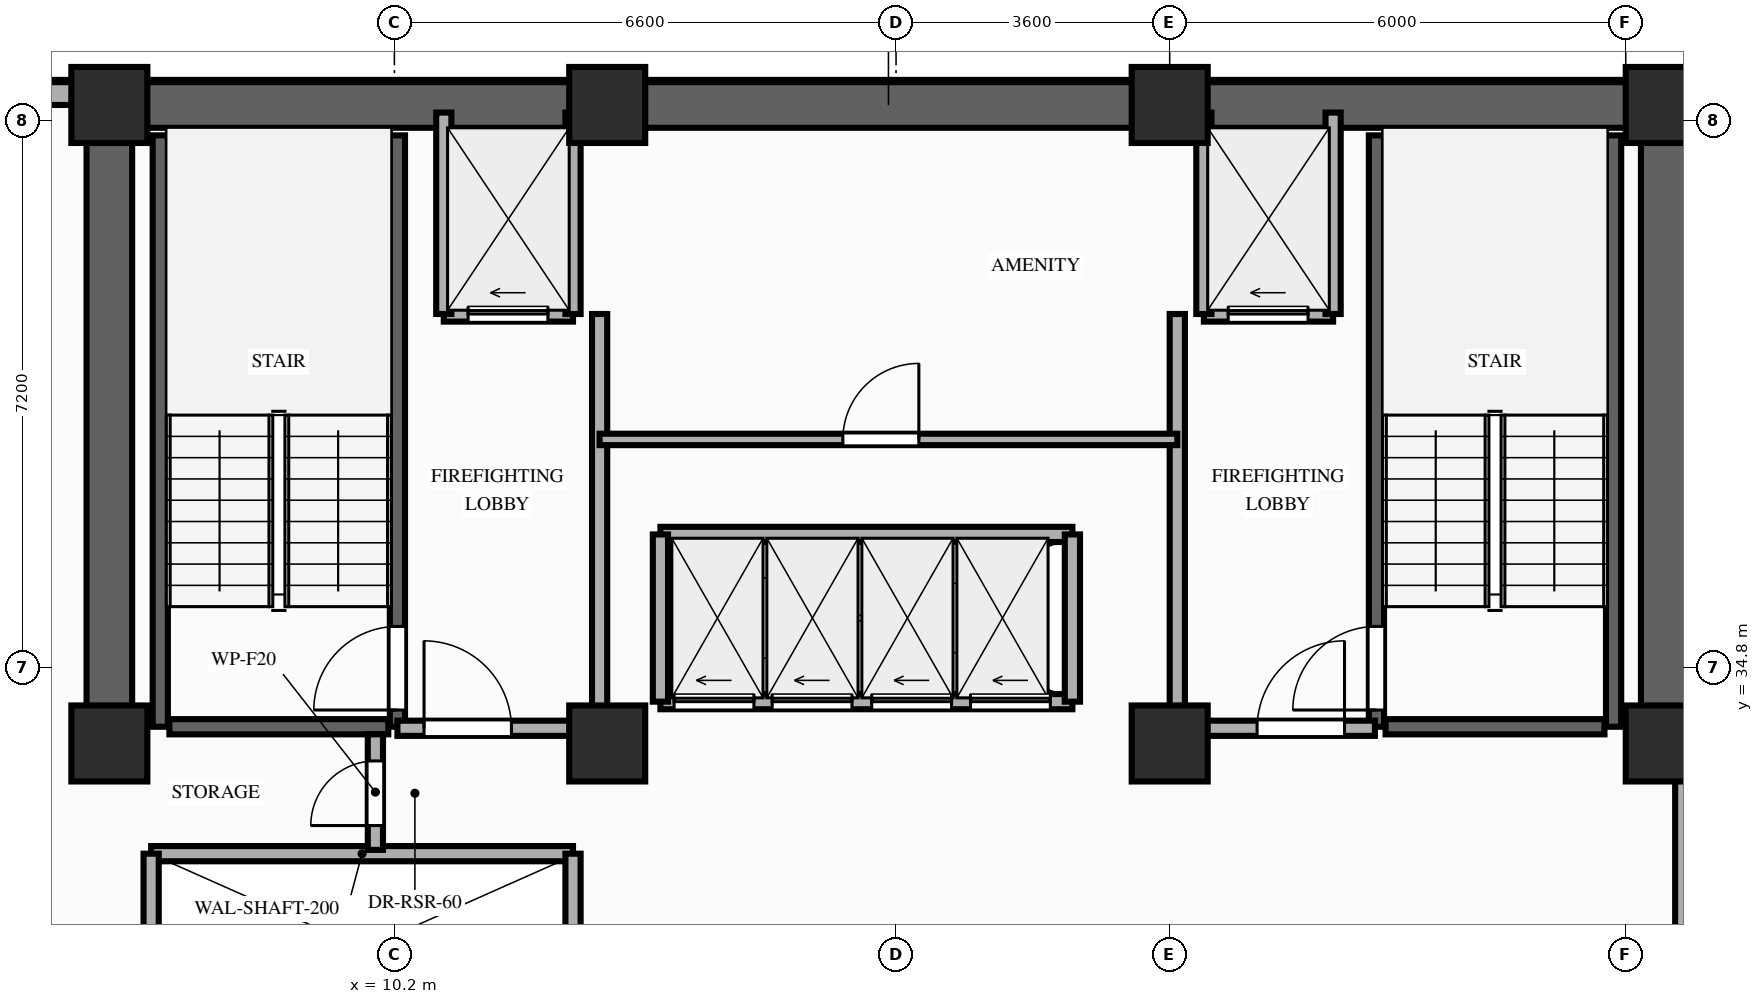
"""IFC4 building model, lengths in metres.
Left out: names, types, materials, properties, quantities, classifications, styles, units other than length and angle.
Written with IfcOpenShell. Run it as: python <this file> out.ifc"""

import sys

from ifc_helpers import new_model, si_unit, direction, frame, frame_2d, origin, origin_2d, place, context, subcontext, project, spatial, rectangle, extrude, element, fill, save


model = new_model("IFC4")
c1 = context("Model", 3, precision=1e-05, world=origin(), true_north=direction((0.0, 1.0)))
c2 = subcontext(c1, "Body", "Model", "MODEL_VIEW")
j1 = project(units=[si_unit("LENGTHUNIT", "METRE"), si_unit("PLANEANGLEUNIT", "RADIAN")], contexts=[c1])
p1 = place(None, origin())
s1 = spatial("IfcSite", under=j1, at=p1, CompositionType="ELEMENT")
p2 = place(p1, origin())
s2 = spatial("IfcBuilding", under=s1, at=p2, CompositionType="ELEMENT")
p3 = place(p2, frame((0.0, 0.0, 117.0)))
s3 = spatial("IfcBuildingStorey", under=s2, at=p3, CompositionType="ELEMENT", Elevation=117.0)
for number, where, z_axis, x_axis in (
    (1, (6.45, 33.8, 0.0), (0.0, 0.0, 1.0), (1.0, 0.0, 0.0)),
    (2, (13.0, 33.8, 0.0), (0.0, 0.0, 1.0), (1.0, 0.0, 0.0)),
    (3, (20.4, 33.8, 0.0), (0.0, 0.0, 1.0), (1.0, 0.0, 0.0)),
    (4, (26.9, 33.8, 0.0), (0.0, 0.0, 1.0), (1.0, 0.0, 0.0)),
    (5, (6.45, 42.2, 0.0), (0.0, 0.0, 1.0), (1.0, 0.0, 0.0)),
    (6, (13.0, 42.2, 0.0), (0.0, 0.0, 1.0), (1.0, 0.0, 0.0)),
    (7, (20.4, 42.2, 0.0), (0.0, 0.0, 1.0), (1.0, 0.0, 0.0)),
    (8, (26.9, 42.2, 0.0), (0.0, 0.0, 1.0), (1.0, 0.0, 0.0)),
):
    element("IfcColumn", number, at=place(p3, frame(where, z_axis=z_axis, x_axis=x_axis)), inside=s3, PredefinedType="COLUMN", context=c2, shape_type="SweptSolid", body=[
        extrude(rectangle(XDim=1.0, YDim=1.0, at=origin_2d()), origin(), (0.0, 0.0, 1.0), 3.2),
    ])
p4 = place(p3, frame((6.0, 42.35, 0.0), z_axis=(0.0, 0.0, 1.0), x_axis=(-1.0, 0.0, 0.0)))
e9 = element("IfcWall", 9, at=p4, inside=s3, PredefinedType="STANDARD", context=c2, shape_type="SweptSolid", body=[
    extrude(rectangle(XDim=2.0, YDim=0.3, at=frame_2d((1.0, 0.0))), origin(), (0.0, 0.0, 1.0), 3.02),
])
p5 = place(p3, frame((6.45, 42.2, 0.0), z_axis=(0.0, 0.0, 1.0), x_axis=(1.0, 0.0, 0.0)))
e10 = element("IfcWall", 10, at=p5, inside=s3, PredefinedType="SHEAR", context=c2, shape_type="SweptSolid", body=[
    extrude(rectangle(XDim=20.45, YDim=0.6, at=frame_2d((10.225, 0.0))), origin(), (0.0, 0.0, 1.0), 3.02),
])
for number, where, z_axis, x_axis in (
    (11, (6.45, 33.8, 0.0), (0.0, 0.0, 1.0), (0.0, 1.0, 0.0)),
    (12, (26.9, 33.8, 0.0), (0.0, 0.0, 1.0), (0.0, 1.0, 0.0)),
):
    element("IfcWall", number, at=place(p3, frame(where, z_axis=z_axis, x_axis=x_axis)), inside=s3, PredefinedType="SHEAR", context=c2, shape_type="SweptSolid", body=[
        extrude(rectangle(XDim=7.95, YDim=0.6, at=frame_2d((3.975, 0.0))), origin(), (0.0, 0.0, 1.0), 3.02),
    ])
p6 = place(p3, frame((7.12, 34.02, 0.0), z_axis=(0.0, 0.0, 1.0), x_axis=(0.0, 1.0, 0.0)))
e13 = element("IfcWall", 13, at=p6, inside=s3, PredefinedType="SHEAR", context=c2, shape_type="SweptSolid", body=[
    extrude(rectangle(XDim=7.78, YDim=0.2, at=frame_2d((3.89, 0.0))), origin(), (0.0, 0.0, 1.0), 3.02),
])
p7 = place(p3, frame((10.24, 34.02, 0.0), z_axis=(0.0, 0.0, 1.0), x_axis=(0.0, 1.0, 0.0)))
e14 = element("IfcWall", 14, at=p7, inside=s3, PredefinedType="SHEAR", context=c2, shape_type="SweptSolid", body=[
    extrude(rectangle(XDim=7.78, YDim=0.2, at=frame_2d((3.89, 0.0))), origin(), (0.0, 0.0, 1.0), 3.02),
])
p8 = place(p7, frame((0.22, 0.0, 0.0)))
e15 = element("IfcOpeningElement", 15, at=p8, cuts=e14, PredefinedType="OPENING", context=c2, shape_type="SweptSolid", body=[
    extrude(rectangle(XDim=1.1, YDim=2.15, at=frame_2d((0.55, 1.075))), frame((0.0, 0.11, 0.0), z_axis=(0.0, -1.0, 0.0), x_axis=(1.0, 0.0, 0.0)), (0.0, 0.0, 1.0), 0.22),
])
p9 = place(p3, frame((7.24, 34.02, 0.0), z_axis=(0.0, 0.0, 1.0), x_axis=(1.0, 0.0, 0.0)))
e16 = element("IfcWall", 16, at=p9, inside=s3, PredefinedType="SHEAR", context=c2, shape_type="SweptSolid", body=[
    extrude(rectangle(XDim=2.88, YDim=0.2, at=frame_2d((1.44, 0.0))), origin(), (0.0, 0.0, 1.0), 3.02),
])
p10 = place(p3, frame((23.12, 34.02, 0.0), z_axis=(0.0, 0.0, 1.0), x_axis=(0.0, 1.0, 0.0)))
e17 = element("IfcWall", 17, at=p10, inside=s3, PredefinedType="SHEAR", context=c2, shape_type="SweptSolid", body=[
    extrude(rectangle(XDim=7.78, YDim=0.2, at=frame_2d((3.89, 0.0))), origin(), (0.0, 0.0, 1.0), 3.02),
])
p11 = place(p10, frame((0.22, 0.0, 0.0)))
e18 = element("IfcOpeningElement", 18, at=p11, cuts=e17, PredefinedType="OPENING", context=c2, shape_type="SweptSolid", body=[
    extrude(rectangle(XDim=1.1, YDim=2.15, at=frame_2d((0.55, 1.075))), frame((0.0, 0.11, 0.0), z_axis=(0.0, -1.0, 0.0), x_axis=(1.0, 0.0, 0.0)), (0.0, 0.0, 1.0), 0.22),
])
p12 = place(p3, frame((26.24, 34.02, 0.0), z_axis=(0.0, 0.0, 1.0), x_axis=(0.0, 1.0, 0.0)))
e19 = element("IfcWall", 19, at=p12, inside=s3, PredefinedType="SHEAR", context=c2, shape_type="SweptSolid", body=[
    extrude(rectangle(XDim=7.78, YDim=0.2, at=frame_2d((3.89, 0.0))), origin(), (0.0, 0.0, 1.0), 3.02),
])
p13 = place(p3, frame((23.24, 34.02, 0.0), z_axis=(0.0, 0.0, 1.0), x_axis=(1.0, 0.0, 0.0)))
e20 = element("IfcWall", 20, at=p13, inside=s3, PredefinedType="SHEAR", context=c2, shape_type="SweptSolid", body=[
    extrude(rectangle(XDim=2.88, YDim=0.2, at=frame_2d((1.44, 0.0))), origin(), (0.0, 0.0, 1.0), 3.02),
])
p14 = place(p3, frame((7.0, 32.35, 0.0), z_axis=(0.0, 0.0, 1.0), x_axis=(1.0, 0.0, 0.0)))
e21 = element("IfcWall", 21, at=p14, inside=s3, PredefinedType="MOVABLE", context=c2, shape_type="SweptSolid", body=[
    extrude(rectangle(XDim=5.55, YDim=0.2, at=frame_2d((2.775, 0.0))), origin(), (0.0, 0.0, 1.0), 3.02),
])
for number, where, z_axis, x_axis in (
    (22, (7.0, 29.85, 0.0), (0.0, 0.0, 1.0), (0.0, 1.0, 0.0)),
    (23, (12.55, 29.85, 0.0), (0.0, 0.0, 1.0), (0.0, 1.0, 0.0)),
):
    element("IfcWall", number, at=place(p3, frame(where, z_axis=z_axis, x_axis=x_axis)), inside=s3, PredefinedType="MOVABLE", context=c2, shape_type="SweptSolid", body=[
        extrude(rectangle(XDim=2.5, YDim=0.2, at=frame_2d((1.25, 0.0))), origin(), (0.0, 0.0, 1.0), 3.02),
    ])
p15 = place(p3, frame((10.85, 39.45, 0.0), z_axis=(0.0, 0.0, 1.0), x_axis=(1.0, 0.0, 0.0)))
e24 = element("IfcWall", 24, at=p15, inside=s3, PredefinedType="MOVABLE", context=c2, shape_type="SweptSolid", body=[
    extrude(rectangle(XDim=1.7, YDim=0.2, at=frame_2d((0.85, 0.0))), origin(), (0.0, 0.0, 1.0), 3.02),
])
p16 = place(p15, frame((0.32, 0.0, 0.0)))
e25 = element("IfcOpeningElement", 25, at=p16, cuts=e24, PredefinedType="OPENING", context=c2, shape_type="SweptSolid", body=[
    extrude(rectangle(XDim=1.05, YDim=2.15, at=frame_2d((0.525, 1.075))), frame((0.0, 0.11, 0.0), z_axis=(0.0, -1.0, 0.0), x_axis=(1.0, 0.0, 0.0)), (0.0, 0.0, 1.0), 0.22),
])
p17 = place(p3, frame((20.85, 39.45, 0.0), z_axis=(0.0, 0.0, 1.0), x_axis=(1.0, 0.0, 0.0)))
e26 = element("IfcWall", 26, at=p17, inside=s3, PredefinedType="MOVABLE", context=c2, shape_type="SweptSolid", body=[
    extrude(rectangle(XDim=1.7, YDim=0.2, at=frame_2d((0.85, 0.0))), origin(), (0.0, 0.0, 1.0), 3.02),
])
p18 = place(p17, frame((0.32, 0.0, 0.0)))
e27 = element("IfcOpeningElement", 27, at=p18, cuts=e26, PredefinedType="OPENING", context=c2, shape_type="SweptSolid", body=[
    extrude(rectangle(XDim=1.05, YDim=2.15, at=frame_2d((0.525, 1.075))), frame((0.0, 0.11, 0.0), z_axis=(0.0, -1.0, 0.0), x_axis=(1.0, 0.0, 0.0)), (0.0, 0.0, 1.0), 0.22),
])
for number, where, z_axis, x_axis in (
    (28, (10.85, 39.45, 0.0), (0.0, 0.0, 1.0), (0.0, 1.0, 0.0)),
    (29, (12.55, 39.45, 0.0), (0.0, 0.0, 1.0), (0.0, 1.0, 0.0)),
):
    element("IfcWall", number, at=place(p3, frame(where, z_axis=z_axis, x_axis=x_axis)), inside=s3, PredefinedType="MOVABLE", context=c2, shape_type="SweptSolid", body=[
        extrude(rectangle(XDim=2.65, YDim=0.2, at=frame_2d((1.325, 0.0))), origin(), (0.0, 0.0, 1.0), 2.41),
    ])
p19 = place(p3, frame((12.9, 34.0, 0.0), z_axis=(0.0, 0.0, 1.0), x_axis=(0.0, 1.0, 0.0)))
e30 = element("IfcWall", 30, at=p19, inside=s3, PredefinedType="PARTITIONING", context=c2, shape_type="SweptSolid", body=[
    extrude(rectangle(XDim=5.45, YDim=0.2, at=frame_2d((2.725, 0.0))), origin(), (0.0, 0.0, 1.0), 2.41),
])
p20 = place(p3, frame((10.24, 34.0, 0.0), z_axis=(0.0, 0.0, 1.0), x_axis=(1.0, 0.0, 0.0)))
e31 = element("IfcWall", 31, at=p20, inside=s3, PredefinedType="PARTITIONING", context=c2, shape_type="SweptSolid", body=[
    extrude(rectangle(XDim=2.66, YDim=0.2, at=frame_2d((1.33, 0.0))), origin(), (0.0, 0.0, 1.0), 2.41),
])
p21 = place(p20, frame((0.35, 0.0, 0.0)))
e32 = element("IfcOpeningElement", 32, at=p21, cuts=e31, PredefinedType="OPENING", context=c2, shape_type="SweptSolid", body=[
    extrude(rectangle(XDim=1.15, YDim=2.15, at=frame_2d((0.575, 1.075))), frame((0.0, 0.11, 0.0), z_axis=(0.0, -1.0, 0.0), x_axis=(1.0, 0.0, 0.0)), (0.0, 0.0, 1.0), 0.22),
])
for number, where, z_axis, x_axis in (
    (33, (20.85, 39.45, 0.0), (0.0, 0.0, 1.0), (0.0, 1.0, 0.0)),
    (34, (22.55, 39.45, 0.0), (0.0, 0.0, 1.0), (0.0, 1.0, 0.0)),
):
    element("IfcWall", number, at=place(p3, frame(where, z_axis=z_axis, x_axis=x_axis)), inside=s3, PredefinedType="MOVABLE", context=c2, shape_type="SweptSolid", body=[
        extrude(rectangle(XDim=2.65, YDim=0.2, at=frame_2d((1.325, 0.0))), origin(), (0.0, 0.0, 1.0), 2.41),
    ])
p22 = place(p3, frame((20.5, 34.0, 0.0), z_axis=(0.0, 0.0, 1.0), x_axis=(0.0, 1.0, 0.0)))
e35 = element("IfcWall", 35, at=p22, inside=s3, PredefinedType="PARTITIONING", context=c2, shape_type="SweptSolid", body=[
    extrude(rectangle(XDim=5.45, YDim=0.2, at=frame_2d((2.725, 0.0))), origin(), (0.0, 0.0, 1.0), 2.41),
])
p23 = place(p3, frame((20.5, 34.0, 0.0), z_axis=(0.0, 0.0, 1.0), x_axis=(1.0, 0.0, 0.0)))
e36 = element("IfcWall", 36, at=p23, inside=s3, PredefinedType="PARTITIONING", context=c2, shape_type="SweptSolid", body=[
    extrude(rectangle(XDim=2.6, YDim=0.2, at=frame_2d((1.3, 0.0))), origin(), (0.0, 0.0, 1.0), 2.41),
])
p24 = place(p23, frame((1.05, 0.0, 0.0)))
e37 = element("IfcOpeningElement", 37, at=p24, cuts=e36, PredefinedType="OPENING", context=c2, shape_type="SweptSolid", body=[
    extrude(rectangle(XDim=1.15, YDim=2.15, at=frame_2d((0.575, 1.075))), frame((0.0, 0.11, 0.0), z_axis=(0.0, -1.0, 0.0), x_axis=(1.0, 0.0, 0.0)), (0.0, 0.0, 1.0), 0.22),
])
p25 = place(p3, frame((9.95, 32.4, 0.0), z_axis=(0.0, 0.0, 1.0), x_axis=(0.0, 1.0, 0.0)))
e38 = element("IfcWall", 38, at=p25, inside=s3, PredefinedType="PARTITIONING", context=c2, shape_type="SweptSolid", body=[
    extrude(rectangle(XDim=1.52, YDim=0.2, at=frame_2d((0.76, 0.0))), origin(), (0.0, 0.0, 1.0), 2.41),
])
p26 = place(p25, frame((0.32, 0.0, 0.0)))
e39 = element("IfcOpeningElement", 39, at=p26, cuts=e38, PredefinedType="OPENING", context=c2, shape_type="SweptSolid", body=[
    extrude(rectangle(XDim=0.85, YDim=2.05, at=frame_2d((0.425, 1.025))), frame((0.0, 0.11, 0.0), z_axis=(0.0, -1.0, 0.0), x_axis=(1.0, 0.0, 0.0)), (0.0, 0.0, 1.0), 0.22),
])
p27 = place(p3, frame((12.9, 37.8, 0.0), z_axis=(0.0, 0.0, 1.0), x_axis=(1.0, 0.0, 0.0)))
e40 = element("IfcWall", 40, at=p27, inside=s3, PredefinedType="PARTITIONING", context=c2, shape_type="SweptSolid", body=[
    extrude(rectangle(XDim=7.6, YDim=0.15, at=frame_2d((3.8, 0.0))), origin(), (0.0, 0.0, 1.0), 3.02),
])
p28 = place(p27, frame((3.2, 0.0, 0.0)))
e41 = element("IfcOpeningElement", 41, at=p28, cuts=e40, PredefinedType="OPENING", context=c2, shape_type="SweptSolid", body=[
    extrude(rectangle(XDim=1.0, YDim=2.15, at=frame_2d((0.5, 1.075))), frame((0.0, 0.085, 0.0), z_axis=(0.0, -1.0, 0.0), x_axis=(1.0, 0.0, 0.0)), (0.0, 0.0, 1.0), 0.17),
])
p29 = place(p3, frame((13.7, 34.35, 0.0), z_axis=(0.0, 0.0, 1.0), x_axis=(1.0, 0.0, 0.0)))
e42 = element("IfcWall", 42, at=p29, inside=s3, PredefinedType="MOVABLE", context=c2, shape_type="SweptSolid", body=[
    extrude(rectangle(XDim=5.42, YDim=0.2, at=frame_2d((2.71, 0.0))), origin(), (0.0, 0.0, 1.0), 3.02),
])
p30 = place(p29, frame((0.18, 0.0, 0.0)))
e43 = element("IfcOpeningElement", 43, at=p30, cuts=e42, PredefinedType="OPENING", context=c2, shape_type="SweptSolid", body=[
    extrude(rectangle(XDim=1.05, YDim=2.15, at=frame_2d((0.525, 1.075))), frame((0.0, 0.11, 0.0), z_axis=(0.0, -1.0, 0.0), x_axis=(1.0, 0.0, 0.0)), (0.0, 0.0, 1.0), 0.22),
])
p31 = place(p29, frame((1.47, 0.0, 0.0)))
e44 = element("IfcOpeningElement", 44, at=p31, cuts=e42, PredefinedType="OPENING", context=c2, shape_type="SweptSolid", body=[
    extrude(rectangle(XDim=1.05, YDim=2.15, at=frame_2d((0.525, 1.075))), frame((0.0, 0.11, 0.0), z_axis=(0.0, -1.0, 0.0), x_axis=(1.0, 0.0, 0.0)), (0.0, 0.0, 1.0), 0.22),
])
p32 = place(p29, frame((2.78, 0.0, 0.0)))
e45 = element("IfcOpeningElement", 45, at=p32, cuts=e42, PredefinedType="OPENING", context=c2, shape_type="SweptSolid", body=[
    extrude(rectangle(XDim=1.05, YDim=2.15, at=frame_2d((0.525, 1.075))), frame((0.0, 0.11, 0.0), z_axis=(0.0, -1.0, 0.0), x_axis=(1.0, 0.0, 0.0)), (0.0, 0.0, 1.0), 0.22),
])
p33 = place(p29, frame((4.08, 0.0, 0.0)))
e46 = element("IfcOpeningElement", 46, at=p33, cuts=e42, PredefinedType="OPENING", context=c2, shape_type="SweptSolid", body=[
    extrude(rectangle(XDim=1.05, YDim=2.15, at=frame_2d((0.525, 1.075))), frame((0.0, 0.11, 0.0), z_axis=(0.0, -1.0, 0.0), x_axis=(1.0, 0.0, 0.0)), (0.0, 0.0, 1.0), 0.22),
])
p34 = place(p3, frame((13.7, 36.55, 0.0), z_axis=(0.0, 0.0, 1.0), x_axis=(1.0, 0.0, 0.0)))
e47 = element("IfcWall", 47, at=p34, inside=s3, PredefinedType="MOVABLE", context=c2, shape_type="SweptSolid", body=[
    extrude(rectangle(XDim=5.42, YDim=0.2, at=frame_2d((2.71, 0.0))), origin(), (0.0, 0.0, 1.0), 3.02),
])
for number, where, z_axis, x_axis in (
    (48, (13.7, 34.35, 0.0), (0.0, 0.0, 1.0), (0.0, 1.0, 0.0)),
    (49, (19.12, 34.35, 0.0), (0.0, 0.0, 1.0), (0.0, 1.0, 0.0)),
):
    element("IfcWall", number, at=place(p3, frame(where, z_axis=z_axis, x_axis=x_axis)), inside=s3, PredefinedType="MOVABLE", context=c2, shape_type="SweptSolid", body=[
        extrude(rectangle(XDim=2.2, YDim=0.2, at=frame_2d((1.1, 0.0))), origin(), (0.0, 0.0, 1.0), 3.02),
    ])
p35 = place(p3, frame((27.15, 31.2, 0.0), z_axis=(0.0, 0.0, 1.0), x_axis=(0.0, 1.0, 0.0)))
e50 = element("IfcWall", 50, at=p35, inside=s3, PredefinedType="PARTITIONING", context=c2, shape_type="SweptSolid", body=[
    extrude(rectangle(XDim=2.48, YDim=0.2, at=frame_2d((1.24, 0.0))), origin(), (0.0, 0.0, 1.0), 2.41),
])
p36 = place(p8, origin())
e51 = element("IfcDoor", 51, at=p36, inside=s3, OperationType="SINGLE_SWING_LEFT", PredefinedType="DOOR", context=c2, shape_type="SweptSolid", body=[
    extrude(rectangle(XDim=1.1, YDim=2.15, at=frame_2d((0.55, 1.075))), frame((0.0, 0.025, 0.0), z_axis=(0.0, -1.0, 0.0), x_axis=(1.0, 0.0, 0.0)), (0.0, 0.0, 1.0), 0.05),
])
fill(e15, e51)
p37 = place(p11, origin())
e52 = element("IfcDoor", 52, at=p37, inside=s3, OperationType="SINGLE_SWING_LEFT", PredefinedType="DOOR", context=c2, shape_type="SweptSolid", body=[
    extrude(rectangle(XDim=1.1, YDim=2.15, at=frame_2d((0.55, 1.075))), frame((0.0, 0.025, 0.0), z_axis=(0.0, -1.0, 0.0), x_axis=(1.0, 0.0, 0.0)), (0.0, 0.0, 1.0), 0.05),
])
fill(e18, e52)
p38 = place(p16, origin())
e53 = element("IfcDoor", 53, at=p38, inside=s3, OperationType="SLIDING_TO_LEFT", PredefinedType="DOOR", context=c2, shape_type="SweptSolid", body=[
    extrude(rectangle(XDim=1.05, YDim=2.15, at=frame_2d((0.525, 1.075))), frame((0.0, 0.025, 0.0), z_axis=(0.0, -1.0, 0.0), x_axis=(1.0, 0.0, 0.0)), (0.0, 0.0, 1.0), 0.05),
])
fill(e25, e53)
p39 = place(p18, origin())
e54 = element("IfcDoor", 54, at=p39, inside=s3, OperationType="SLIDING_TO_LEFT", PredefinedType="DOOR", context=c2, shape_type="SweptSolid", body=[
    extrude(rectangle(XDim=1.05, YDim=2.15, at=frame_2d((0.525, 1.075))), frame((0.0, 0.025, 0.0), z_axis=(0.0, -1.0, 0.0), x_axis=(1.0, 0.0, 0.0)), (0.0, 0.0, 1.0), 0.05),
])
fill(e27, e54)
p40 = place(p21, origin())
e55 = element("IfcDoor", 55, at=p40, inside=s3, OperationType="SINGLE_SWING_LEFT", PredefinedType="DOOR", context=c2, shape_type="SweptSolid", body=[
    extrude(rectangle(XDim=1.15, YDim=2.15, at=frame_2d((0.575, 1.075))), frame((0.0, 0.025, 0.0), z_axis=(0.0, -1.0, 0.0), x_axis=(1.0, 0.0, 0.0)), (0.0, 0.0, 1.0), 0.05),
])
fill(e32, e55)
p41 = place(p24, origin())
e56 = element("IfcDoor", 56, at=p41, inside=s3, OperationType="SINGLE_SWING_RIGHT", PredefinedType="DOOR", context=c2, shape_type="SweptSolid", body=[
    extrude(rectangle(XDim=1.15, YDim=2.15, at=frame_2d((0.575, 1.075))), frame((0.0, 0.025, 0.0), z_axis=(0.0, -1.0, 0.0), x_axis=(1.0, 0.0, 0.0)), (0.0, 0.0, 1.0), 0.05),
])
fill(e37, e56)
p42 = place(p26, origin())
e57 = element("IfcDoor", 57, at=p42, inside=s3, OperationType="SINGLE_SWING_LEFT", PredefinedType="DOOR", context=c2, shape_type="SweptSolid", body=[
    extrude(rectangle(XDim=0.85, YDim=2.05, at=frame_2d((0.425, 1.025))), frame((0.0, 0.025, 0.0), z_axis=(0.0, -1.0, 0.0), x_axis=(1.0, 0.0, 0.0)), (0.0, 0.0, 1.0), 0.05),
])
fill(e39, e57)
p43 = place(p28, origin())
e58 = element("IfcDoor", 58, at=p43, inside=s3, OperationType="SINGLE_SWING_RIGHT", PredefinedType="DOOR", context=c2, shape_type="SweptSolid", body=[
    extrude(rectangle(XDim=1.0, YDim=2.15, at=frame_2d((0.5, 1.075))), frame((0.0, 0.025, 0.0), z_axis=(0.0, -1.0, 0.0), x_axis=(1.0, 0.0, 0.0)), (0.0, 0.0, 1.0), 0.05),
])
fill(e41, e58)
p44 = place(p30, origin())
e59 = element("IfcDoor", 59, at=p44, inside=s3, OperationType="SLIDING_TO_LEFT", PredefinedType="DOOR", context=c2, shape_type="SweptSolid", body=[
    extrude(rectangle(XDim=1.05, YDim=2.15, at=frame_2d((0.525, 1.075))), frame((0.0, 0.025, 0.0), z_axis=(0.0, -1.0, 0.0), x_axis=(1.0, 0.0, 0.0)), (0.0, 0.0, 1.0), 0.05),
])
fill(e43, e59)
p45 = place(p31, origin())
e60 = element("IfcDoor", 60, at=p45, inside=s3, OperationType="SLIDING_TO_LEFT", PredefinedType="DOOR", context=c2, shape_type="SweptSolid", body=[
    extrude(rectangle(XDim=1.05, YDim=2.15, at=frame_2d((0.525, 1.075))), frame((0.0, 0.025, 0.0), z_axis=(0.0, -1.0, 0.0), x_axis=(1.0, 0.0, 0.0)), (0.0, 0.0, 1.0), 0.05),
])
fill(e44, e60)
p46 = place(p32, origin())
e61 = element("IfcDoor", 61, at=p46, inside=s3, OperationType="SLIDING_TO_LEFT", PredefinedType="DOOR", context=c2, shape_type="SweptSolid", body=[
    extrude(rectangle(XDim=1.05, YDim=2.15, at=frame_2d((0.525, 1.075))), frame((0.0, 0.025, 0.0), z_axis=(0.0, -1.0, 0.0), x_axis=(1.0, 0.0, 0.0)), (0.0, 0.0, 1.0), 0.05),
])
fill(e45, e61)
p47 = place(p33, origin())
e62 = element("IfcDoor", 62, at=p47, inside=s3, OperationType="SLIDING_TO_LEFT", PredefinedType="DOOR", context=c2, shape_type="SweptSolid", body=[
    extrude(rectangle(XDim=1.05, YDim=2.15, at=frame_2d((0.525, 1.075))), frame((0.0, 0.025, 0.0), z_axis=(0.0, -1.0, 0.0), x_axis=(1.0, 0.0, 0.0)), (0.0, 0.0, 1.0), 0.05),
])
fill(e46, e62)
save(model, sys.argv[1])
